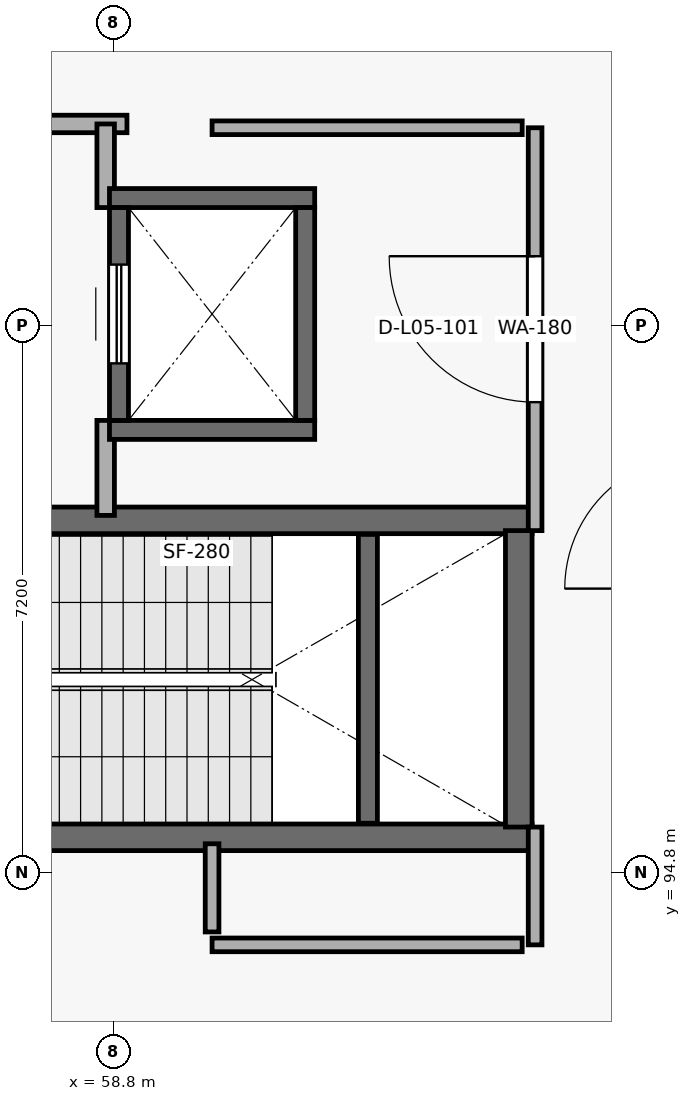
"""IFC4 building model, lengths in metres.
Left out: names, types, materials, properties, quantities, classifications, styles, units other than length and angle.
Written with IfcOpenShell. Run it as: python <this file> out.ifc"""

import sys

from ifc_helpers import new_model, si_unit, direction, frame, frame_2d, origin, place, context, subcontext, project, spatial, rectangle, extrude, element, fill, save


model = new_model("IFC4")
c1 = context("Model", 3, precision=1e-05, world=origin(), true_north=direction((0.0, 1.0)))
c2 = subcontext(c1, "Body", "Model", "MODEL_VIEW")
j1 = project(units=[si_unit("LENGTHUNIT", "METRE"), si_unit("PLANEANGLEUNIT", "RADIAN")], contexts=[c1])
p1 = place(None, origin())
s1 = spatial("IfcSite", under=j1, at=p1, CompositionType="ELEMENT")
p2 = place(p1, origin())
s2 = spatial("IfcBuilding", under=s1, at=p2, CompositionType="ELEMENT")
p3 = place(p2, frame((0.0, 0.0, 20.4)))
s3 = spatial("IfcBuildingStorey", under=s2, at=p3, CompositionType="ELEMENT", Elevation=20.4)
p4 = place(p3, frame((55.09, 95.265, 0.0), z_axis=(0.0, 0.0, 1.0), x_axis=(1.0, 0.0, 0.0)))
e1 = element("IfcWall", 1, at=p4, inside=s3, PredefinedType="SHEAR", context=c2, shape_type="SweptSolid", body=[
    extrude(rectangle(XDim=9.22, YDim=0.35, at=frame_2d((4.61, 0.0))), origin(), (0.0, 0.0, 1.0), 4.84),
])
p5 = place(p4, frame((0.45, 0.0, 0.0)))
e2 = element("IfcOpeningElement", 2, at=p5, cuts=e1, PredefinedType="OPENING", context=c2, shape_type="SweptSolid", body=[
    extrude(rectangle(XDim=1.25, YDim=2.2, at=frame_2d((0.625, 1.1))), frame((0.0, 0.185, 0.0), z_axis=(0.0, -1.0, 0.0), x_axis=(1.0, 0.0, 0.0)), (0.0, 0.0, 1.0), 0.37),
])
p6 = place(p3, frame((64.31, 99.435, 0.0), z_axis=(0.0, 0.0, 1.0), x_axis=(-1.0, 0.0, 0.0)))
e3 = element("IfcWall", 3, at=p6, inside=s3, PredefinedType="SHEAR", context=c2, shape_type="SweptSolid", body=[
    extrude(rectangle(XDim=9.22, YDim=0.35, at=frame_2d((4.61, 0.0))), origin(), (0.0, 0.0, 1.0), 4.84),
])
p7 = place(p6, frame((7.72, 0.0, 0.0)))
e4 = element("IfcOpeningElement", 4, at=p7, cuts=e3, PredefinedType="OPENING", context=c2, shape_type="SweptSolid", body=[
    extrude(rectangle(XDim=1.2, YDim=2.2, at=frame_2d((0.6, 1.1))), frame((0.0, 0.185, 0.0), z_axis=(0.0, -1.0, 0.0), x_axis=(1.0, 0.0, 0.0)), (0.0, 0.0, 1.0), 0.37),
])
p8 = place(p3, frame((64.135, 99.3, 0.0), z_axis=(0.0, 0.0, 1.0), x_axis=(0.0, -1.0, 0.0)))
e5 = element("IfcWall", 5, at=p8, inside=s3, PredefinedType="SHEAR", context=c2, shape_type="SweptSolid", body=[
    extrude(rectangle(XDim=3.9, YDim=0.35, at=frame_2d((1.95, 0.0))), origin(), (0.0, 0.0, 1.0), 4.84),
])
p9 = place(p3, frame((62.15, 95.45, 0.0), z_axis=(0.0, 0.0, 1.0), x_axis=(0.0, 1.0, 0.0)))
e6 = element("IfcWall", 6, at=p9, inside=s3, PredefinedType="SHEAR", context=c2, shape_type="SweptSolid", body=[
    extrude(rectangle(XDim=3.8, YDim=0.25, at=frame_2d((1.9, 0.0))), origin(), (0.0, 0.0, 1.0), 2.37),
])
p10 = place(p3, frame((55.09, 104.65, 0.0), z_axis=(0.0, 0.0, 1.0), x_axis=(1.0, 0.0, 0.0)))
e7 = element("IfcWall", 7, at=p10, inside=s3, PredefinedType="PARTITIONING", context=c2, shape_type="SweptSolid", body=[
    extrude(rectangle(XDim=3.89, YDim=0.23, at=frame_2d((1.945, 0.0))), origin(), (0.0, 0.0, 1.0), 4.84),
])
p11 = place(p10, frame((1.15, 0.0, 0.0)))
e8 = element("IfcOpeningElement", 8, at=p11, cuts=e7, PredefinedType="OPENING", context=c2, shape_type="SweptSolid", body=[
    extrude(rectangle(XDim=1.2, YDim=2.2, at=frame_2d((0.6, 1.1))), frame((0.0, 0.125, 0.0), z_axis=(0.0, -1.0, 0.0), x_axis=(1.0, 0.0, 0.0)), (0.0, 0.0, 1.0), 0.25),
])
p12 = place(p3, frame((58.7, 104.65, 0.0), z_axis=(0.0, 0.0, 1.0), x_axis=(0.0, -1.0, 0.0)))
e9 = element("IfcWall", 9, at=p12, inside=s3, PredefinedType="PARTITIONING", context=c2, shape_type="SweptSolid", body=[
    extrude(rectangle(XDim=1.1, YDim=0.23, at=frame_2d((0.55, 0.0))), origin(), (0.0, 0.0, 1.0), 4.84),
])
p13 = place(p3, frame((58.7, 100.75, 0.0), z_axis=(0.0, 0.0, 1.0), x_axis=(0.0, -1.0, 0.0)))
e10 = element("IfcWall", 10, at=p13, inside=s3, PredefinedType="PARTITIONING", context=c2, shape_type="SweptSolid", body=[
    extrude(rectangle(XDim=1.25, YDim=0.23, at=frame_2d((0.625, 0.0))), origin(), (0.0, 0.0, 1.0), 4.84),
])
for number, where, z_axis, x_axis in (
    (11, (58.75, 100.625, 0.0), (0.0, 0.0, 1.0), (1.0, 0.0, 0.0)),
    (12, (61.45, 103.675, 0.0), (0.0, 0.0, 1.0), (-1.0, 0.0, 0.0)),
):
    element("IfcWall", number, at=place(p3, frame(where, z_axis=z_axis, x_axis=x_axis)), inside=s3, PredefinedType="SHEAR", context=c2, shape_type="SweptSolid", body=[
        extrude(rectangle(XDim=2.7, YDim=0.25, at=frame_2d((1.35, 0.0))), origin(), (0.0, 0.0, 1.0), 4.84),
    ])
p14 = place(p3, frame((58.875, 100.75, 0.0), z_axis=(0.0, 0.0, 1.0), x_axis=(0.0, 1.0, 0.0)))
e13 = element("IfcWall", 13, at=p14, inside=s3, PredefinedType="SHEAR", context=c2, shape_type="SweptSolid", body=[
    extrude(rectangle(XDim=2.8, YDim=0.25, at=frame_2d((1.4, 0.0))), origin(), (0.0, 0.0, 1.0), 4.84),
])
p15 = place(p14, frame((0.75, 0.0, 0.0)))
e14 = element("IfcOpeningElement", 14, at=p15, cuts=e13, PredefinedType="OPENING", context=c2, shape_type="SweptSolid", body=[
    extrude(rectangle(XDim=1.3, YDim=2.25, at=frame_2d((0.65, 1.125))), frame((0.0, 0.135, 0.0), z_axis=(0.0, -1.0, 0.0), x_axis=(1.0, 0.0, 0.0)), (0.0, 0.0, 1.0), 0.27),
])
p16 = place(p3, frame((61.325, 103.55, 0.0), z_axis=(0.0, 0.0, 1.0), x_axis=(0.0, -1.0, 0.0)))
e15 = element("IfcWall", 15, at=p16, inside=s3, PredefinedType="SHEAR", context=c2, shape_type="SweptSolid", body=[
    extrude(rectangle(XDim=2.8, YDim=0.25, at=frame_2d((1.4, 0.0))), origin(), (0.0, 0.0, 1.0), 4.84),
])
p17 = place(p3, frame((64.35, 104.6, 0.0), z_axis=(0.0, 0.0, 1.0), x_axis=(0.0, -1.0, 0.0)))
e16 = element("IfcWall", 16, at=p17, inside=s3, PredefinedType="PARTITIONING", context=c2, shape_type="SweptSolid", body=[
    extrude(rectangle(XDim=5.3, YDim=0.18, at=frame_2d((2.65, 0.0))), origin(), (0.0, 0.0, 1.0), 4.84),
])
p18 = place(p17, frame((1.69, 0.0, 0.0)))
e17 = element("IfcOpeningElement", 17, at=p18, cuts=e16, PredefinedType="OPENING", context=c2, shape_type="SweptSolid", body=[
    extrude(rectangle(XDim=1.92, YDim=2.55, at=frame_2d((0.96, 1.275))), frame((0.0, 0.1, 0.0), z_axis=(0.0, -1.0, 0.0), x_axis=(1.0, 0.0, 0.0)), (0.0, 0.0, 1.0), 0.2),
])
p19 = place(p3, frame((64.35, 95.4, 0.0), z_axis=(0.0, 0.0, 1.0), x_axis=(0.0, -1.0, 0.0)))
e18 = element("IfcWall", 18, at=p19, inside=s3, PredefinedType="PARTITIONING", context=c2, shape_type="SweptSolid", body=[
    extrude(rectangle(XDim=1.55, YDim=0.18, at=frame_2d((0.775, 0.0))), origin(), (0.0, 0.0, 1.0), 4.84),
])
for number, where, z_axis, x_axis in (
    (19, (60.1, 104.6, 0.0), (0.0, 0.0, 1.0), (1.0, 0.0, 0.0)),
    (20, (64.18, 93.85, 0.0), (0.0, 0.0, 1.0), (-1.0, 0.0, 0.0)),
):
    element("IfcWall", number, at=place(p3, frame(where, z_axis=z_axis, x_axis=x_axis)), inside=s3, PredefinedType="PARTITIONING", context=c2, shape_type="SweptSolid", body=[
        extrude(rectangle(XDim=4.08, YDim=0.18, at=frame_2d((2.04, 0.0))), origin(), (0.0, 0.0, 1.0), 4.84),
    ])
p20 = place(p3, frame((60.1, 94.02, 0.0), z_axis=(0.0, 0.0, 1.0), x_axis=(0.0, 1.0, 0.0)))
e21 = element("IfcWall", 21, at=p20, inside=s3, PredefinedType="PARTITIONING", context=c2, shape_type="SweptSolid", body=[
    extrude(rectangle(XDim=1.16, YDim=0.18, at=frame_2d((0.58, 0.0))), origin(), (0.0, 0.0, 1.0), 4.84),
])
p21 = place(p15, origin())
e22 = element("IfcDoor", 22, at=p21, inside=s3, OperationType="SLIDING_TO_RIGHT", PredefinedType="DOOR", context=c2, shape_type="SweptSolid", body=[
    extrude(rectangle(XDim=1.3, YDim=2.25, at=frame_2d((0.65, 1.125))), frame((0.0, 0.025, 0.0), z_axis=(0.0, -1.0, 0.0), x_axis=(1.0, 0.0, 0.0)), (0.0, 0.0, 1.0), 0.05),
])
fill(e14, e22)
p22 = place(p18, origin())
e23 = element("IfcDoor", 23, at=p22, inside=s3, OperationType="SINGLE_SWING_RIGHT", PredefinedType="DOOR", context=c2, shape_type="SweptSolid", body=[
    extrude(rectangle(XDim=1.92, YDim=2.55, at=frame_2d((0.96, 1.275))), frame((0.0, 0.025, 0.0), z_axis=(0.0, -1.0, 0.0), x_axis=(1.0, 0.0, 0.0)), (0.0, 0.0, 1.0), 0.05),
])
fill(e17, e23)
save(model, sys.argv[1])
